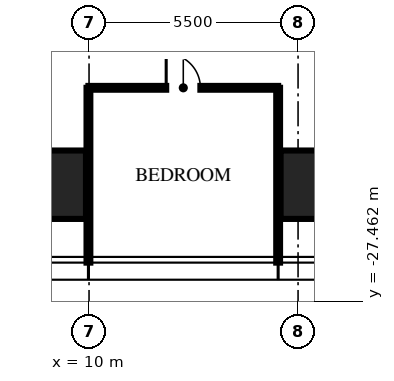
"""IFC4 building model, lengths in metres.
Left out: names, types, materials, properties, quantities, classifications, styles, units other than length and angle.
Written with IfcOpenShell. Run it as: python <this file> out.ifc"""

import sys

from ifc_helpers import new_model, si_unit, direction, frame, frame_2d, origin, origin_2d, place, context, subcontext, project, spatial, rectangle, hollow_rectangle, extrude, element, fill, save


model = new_model("IFC4")
c1 = context("Model", 3, precision=1e-05, world=origin(), true_north=direction((0.0, 1.0)))
c2 = subcontext(c1, "Body", "Model", "MODEL_VIEW")
j1 = project(units=[si_unit("LENGTHUNIT", "METRE"), si_unit("PLANEANGLEUNIT", "RADIAN")], contexts=[c1])
p1 = place(None, origin())
s1 = spatial("IfcSite", under=j1, at=p1, CompositionType="ELEMENT")
p2 = place(p1, origin())
s2 = spatial("IfcBuilding", under=s1, at=p2, CompositionType="ELEMENT")
p3 = place(p2, frame((0.0, 0.0, 203.25)))
s3 = spatial("IfcBuildingStorey", under=s2, at=p3, CompositionType="ELEMENT", Elevation=203.25)
for number, where, z_axis, x_axis in (
    (1, (16.64, -24.4, 0.0), (0.0, 0.0, 1.0), (1.0, 0.0, 0.0)),
    (2, (8.32, -24.4, 0.0), (0.0, 0.0, 1.0), (1.0, 0.0, 0.0)),
):
    element("IfcColumn", number, at=place(p3, frame(where, z_axis=z_axis, x_axis=x_axis)), inside=s3, PredefinedType="COLUMN", context=c2, shape_type="SweptSolid", body=[
        extrude(hollow_rectangle(XDim=3.2, YDim=1.8, WallThickness=0.2, at=origin_2d()), origin(), (0.0, 0.0, 1.0), 3.75),
    ])
for number, where, z_axis, x_axis in (
    (3, (9.984, -21.85, 0.0), (0.0, 0.0, 1.0), (0.0, -1.0, 0.0)),
    (4, (14.976, -21.85, 0.0), (0.0, 0.0, 1.0), (0.0, -1.0, 0.0)),
):
    element("IfcWall", number, at=place(p3, frame(where, z_axis=z_axis, x_axis=x_axis)), inside=s3, PredefinedType="PARTITIONING", context=c2, shape_type="SweptSolid", body=[
        extrude(rectangle(XDim=4.6, YDim=0.1, at=frame_2d((2.3, 0.0))), origin(), (0.0, 0.0, 1.0), 2.91),
    ])
p4 = place(p3, frame((9.984, -21.85, 0.0), z_axis=(0.0, 0.0, 1.0), x_axis=(1.0, 0.0, 0.0)))
e5 = element("IfcWall", 5, at=p4, inside=s3, PredefinedType="PARTITIONING", context=c2, shape_type="SweptSolid", body=[
    extrude(rectangle(XDim=4.992, YDim=0.1, at=frame_2d((2.496, 0.0))), origin(), (0.0, 0.0, 1.0), 2.81),
])
p5 = place(p4, frame((2.046, 0.0, 0.0)))
e6 = element("IfcOpeningElement", 6, at=p5, cuts=e5, PredefinedType="OPENING", context=c2, shape_type="SweptSolid", body=[
    extrude(rectangle(XDim=0.9, YDim=2.1, at=frame_2d((0.45, 1.05))), frame((0.0, 0.06, 0.0), z_axis=(0.0, -1.0, 0.0), x_axis=(1.0, 0.0, 0.0)), (0.0, 0.0, 1.0), 0.12),
])
p6 = place(p5, origin())
e7 = element("IfcDoor", 7, at=p6, inside=s3, OperationType="SINGLE_SWING_LEFT", PredefinedType="DOOR", context=c2, shape_type="SweptSolid", body=[
    extrude(rectangle(XDim=0.9, YDim=2.1, at=frame_2d((0.45, 1.05))), frame((0.0, 0.025, 0.0), z_axis=(0.0, -1.0, 0.0), x_axis=(1.0, 0.0, 0.0)), (0.0, 0.0, 1.0), 0.05),
])
fill(e6, e7)
save(model, sys.argv[1])
